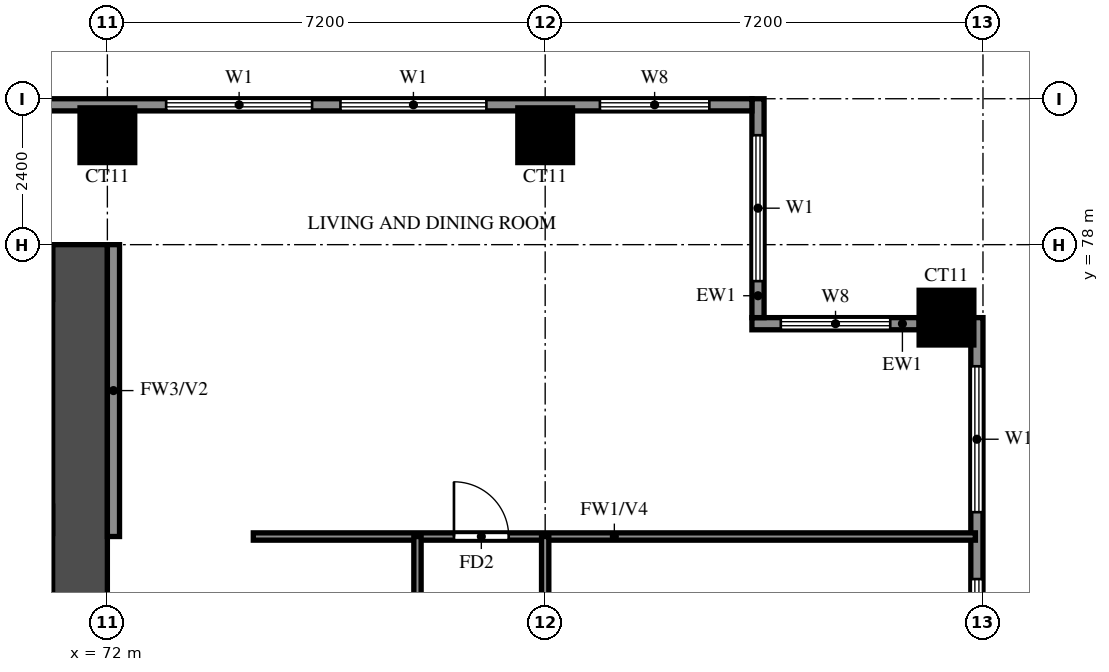
"""IFC4 building model, lengths in metres.
Left out: names, types, materials, properties, quantities, classifications, styles, units other than length and angle.
Written with IfcOpenShell. Run it as: python <this file> out.ifc"""

import sys

from ifc_helpers import new_model, si_unit, direction, frame, frame_2d, origin, origin_2d, place, context, subcontext, project, spatial, rectangle, extrude, source, transform, mapped, element, fill, save


model = new_model("IFC4")
c1 = context("Model", 3, precision=1e-05, world=origin(), true_north=direction((0.0, 1.0)))
c2 = subcontext(c1, "Body", "Model", "MODEL_VIEW")
j1 = project(units=[si_unit("LENGTHUNIT", "METRE"), si_unit("PLANEANGLEUNIT", "RADIAN")], contexts=[c1])
p1 = place(None, origin())
s1 = spatial("IfcSite", under=j1, at=p1, CompositionType="ELEMENT")
p2 = place(p1, origin())
s2 = spatial("IfcBuilding", under=s1, at=p2, CompositionType="ELEMENT")
p3 = place(p2, frame((0.0, 0.0, 100.5)))
s3 = spatial("IfcBuildingStorey", under=s2, at=p3, CompositionType="ELEMENT", Elevation=100.5)
m1 = source(origin(), c2, "Body", "SweptSolid", [
    extrude(rectangle(XDim=0.9, YDim=0.9, at=origin_2d()), origin(), (0.0, 0.0, 1.0), 3.18),
])
for number, where, z_axis, x_axis in (
    (1, (85.8, 76.8, 0.0), (0.0, 0.0, 1.0), (1.0, 0.0, 0.0)),
    (2, (72.0, 79.8, 0.0), (0.0, 0.0, 1.0), (1.0, 0.0, 0.0)),
    (3, (79.2, 79.8, 0.0), (0.0, 0.0, 1.0), (1.0, 0.0, 0.0)),
):
    element("IfcColumn", number, at=place(p3, frame(where, z_axis=z_axis, x_axis=x_axis)), inside=s3, PredefinedType="COLUMN", context=c2, shape_type="MappedRepresentation", body=[
        mapped(m1, transform((0.0, 0.0, 0.0))),
    ])
p4 = place(p3, frame((71.55, 66.0, 0.0), z_axis=(0.0, 0.0, 1.0), x_axis=(0.0, 1.0, 0.0)))
e4 = element("IfcWall", 4, at=p4, inside=s3, PredefinedType="SHEAR", context=c2, shape_type="SweptSolid", body=[
    extrude(rectangle(XDim=12.0, YDim=0.9, at=frame_2d((6.0, 0.0))), origin(), (0.0, 0.0, 1.0), 3.18),
])
p5 = place(p3, frame((29.7, 77.55, 0.0), z_axis=(0.0, 0.0, 1.0), x_axis=(1.0, 0.0, 0.0)))
e5 = element("IfcWall", 5, at=p5, inside=s3, PredefinedType="SHEAR", context=c2, shape_type="SweptSolid", body=[
    extrude(rectangle(XDim=41.4, YDim=0.9, at=frame_2d((20.7, 0.0))), origin(), (0.0, 0.0, 1.0), 3.18),
])
p6 = place(p3, frame((86.3, 48.2, 0.0), z_axis=(0.0, 0.0, 1.0), x_axis=(0.0, 1.0, 0.0)))
e6 = element("IfcWall", 6, at=p6, inside=s3, PredefinedType="SOLIDWALL", context=c2, shape_type="SweptSolid", body=[
    extrude(rectangle(XDim=28.6, YDim=0.2, at=frame_2d((14.3, 0.0))), origin(), (0.0, 0.0, 1.0), 3.18),
])
p7 = place(p6, frame((15.1, 0.0, 0.0)))
e7 = element("IfcOpeningElement", 7, at=p7, cuts=e6, PredefinedType="OPENING", context=c2, shape_type="SweptSolid", body=[
    extrude(rectangle(XDim=1.8, YDim=2.4, at=frame_2d((0.9, 1.2))), frame((0.0, 0.11, 0.0), z_axis=(0.0, -1.0, 0.0), x_axis=(1.0, 0.0, 0.0)), (0.0, 0.0, 1.0), 0.22),
])
p8 = place(p6, frame((0.6, 0.0, 0.6)))
e8 = element("IfcOpeningElement", 8, at=p8, cuts=e6, PredefinedType="OPENING", context=c2, shape_type="SweptSolid", body=[
    extrude(rectangle(XDim=2.4, YDim=2.4, at=frame_2d((1.2, 1.2))), frame((0.0, 0.11, 0.0), z_axis=(0.0, -1.0, 0.0), x_axis=(1.0, 0.0, 0.0)), (0.0, 0.0, 1.0), 0.22),
])
p9 = place(p6, frame((3.8, 0.0, 0.6)))
e9 = element("IfcOpeningElement", 9, at=p9, cuts=e6, PredefinedType="OPENING", context=c2, shape_type="SweptSolid", body=[
    extrude(rectangle(XDim=2.4, YDim=2.4, at=frame_2d((1.2, 1.2))), frame((0.0, 0.11, 0.0), z_axis=(0.0, -1.0, 0.0), x_axis=(1.0, 0.0, 0.0)), (0.0, 0.0, 1.0), 0.22),
])
p10 = place(p6, frame((7.8, 0.0, 0.6)))
e10 = element("IfcOpeningElement", 10, at=p10, cuts=e6, PredefinedType="OPENING", context=c2, shape_type="SweptSolid", body=[
    extrude(rectangle(XDim=2.4, YDim=2.4, at=frame_2d((1.2, 1.2))), frame((0.0, 0.11, 0.0), z_axis=(0.0, -1.0, 0.0), x_axis=(1.0, 0.0, 0.0)), (0.0, 0.0, 1.0), 0.22),
])
p11 = place(p6, frame((10.75, 0.0, 0.6)))
e11 = element("IfcOpeningElement", 11, at=p11, cuts=e6, PredefinedType="OPENING", context=c2, shape_type="SweptSolid", body=[
    extrude(rectangle(XDim=0.9, YDim=2.4, at=frame_2d((0.45, 1.2))), frame((0.0, 0.11, 0.0), z_axis=(0.0, -1.0, 0.0), x_axis=(1.0, 0.0, 0.0)), (0.0, 0.0, 1.0), 0.22),
])
p12 = place(p6, frame((12.5, 0.0, 0.6)))
e12 = element("IfcOpeningElement", 12, at=p12, cuts=e6, PredefinedType="OPENING", context=c2, shape_type="SweptSolid", body=[
    extrude(rectangle(XDim=1.2, YDim=2.4, at=frame_2d((0.6, 1.2))), frame((0.0, 0.11, 0.0), z_axis=(0.0, -1.0, 0.0), x_axis=(1.0, 0.0, 0.0)), (0.0, 0.0, 1.0), 0.22),
])
p13 = place(p6, frame((19.55, 0.0, 1.5)))
e13 = element("IfcOpeningElement", 13, at=p13, cuts=e6, PredefinedType="OPENING", context=c2, shape_type="SweptSolid", body=[
    extrude(rectangle(XDim=0.9, YDim=0.9, at=frame_2d((0.45, 0.45))), frame((0.0, 0.11, 0.0), z_axis=(0.0, -1.0, 0.0), x_axis=(1.0, 0.0, 0.0)), (0.0, 0.0, 1.0), 0.22),
])
p14 = place(p6, frame((22.5, 0.0, 0.6)))
e14 = element("IfcOpeningElement", 14, at=p14, cuts=e6, PredefinedType="OPENING", context=c2, shape_type="SweptSolid", body=[
    extrude(rectangle(XDim=1.8, YDim=2.4, at=frame_2d((0.9, 1.2))), frame((0.0, 0.11, 0.0), z_axis=(0.0, -1.0, 0.0), x_axis=(1.0, 0.0, 0.0)), (0.0, 0.0, 1.0), 0.22),
])
p15 = place(p6, frame((25.4, 0.0, 0.6)))
e15 = element("IfcOpeningElement", 15, at=p15, cuts=e6, PredefinedType="OPENING", context=c2, shape_type="SweptSolid", body=[
    extrude(rectangle(XDim=2.4, YDim=2.4, at=frame_2d((1.2, 1.2))), frame((0.0, 0.11, 0.0), z_axis=(0.0, -1.0, 0.0), x_axis=(1.0, 0.0, 0.0)), (0.0, 0.0, 1.0), 0.22),
])
p16 = place(p3, frame((85.35, 76.7, 0.0), z_axis=(0.0, 0.0, 1.0), x_axis=(-1.0, 0.0, 0.0)))
e16 = element("IfcWall", 16, at=p16, inside=s3, PredefinedType="SOLIDWALL", context=c2, shape_type="SweptSolid", body=[
    extrude(rectangle(XDim=2.75, YDim=0.2, at=frame_2d((1.375, 0.0))), origin(), (0.0, 0.0, 1.0), 3.18),
])
p17 = place(p16, frame((0.475, 0.0, 0.6)))
e17 = element("IfcOpeningElement", 17, at=p17, cuts=e16, PredefinedType="OPENING", context=c2, shape_type="SweptSolid", body=[
    extrude(rectangle(XDim=1.8, YDim=2.4, at=frame_2d((0.9, 1.2))), frame((0.0, 0.11, 0.0), z_axis=(0.0, -1.0, 0.0), x_axis=(1.0, 0.0, 0.0)), (0.0, 0.0, 1.0), 0.22),
])
p18 = place(p3, frame((82.7, 76.8, 0.0), z_axis=(0.0, 0.0, 1.0), x_axis=(0.0, 1.0, 0.0)))
e18 = element("IfcWall", 18, at=p18, inside=s3, PredefinedType="SOLIDWALL", context=c2, shape_type="SweptSolid", body=[
    extrude(rectangle(XDim=3.6, YDim=0.2, at=frame_2d((1.8, 0.0))), origin(), (0.0, 0.0, 1.0), 3.18),
])
p19 = place(p18, frame((0.6, 0.0, 0.6)))
e19 = element("IfcOpeningElement", 19, at=p19, cuts=e18, PredefinedType="OPENING", context=c2, shape_type="SweptSolid", body=[
    extrude(rectangle(XDim=2.4, YDim=2.4, at=frame_2d((1.2, 1.2))), frame((0.0, 0.11, 0.0), z_axis=(0.0, -1.0, 0.0), x_axis=(1.0, 0.0, 0.0)), (0.0, 0.0, 1.0), 0.22),
])
p20 = place(p3, frame((82.6, 80.3, 0.0), z_axis=(0.0, 0.0, 1.0), x_axis=(-1.0, 0.0, 0.0)))
e20 = element("IfcWall", 20, at=p20, inside=s3, PredefinedType="SOLIDWALL", context=c2, shape_type="SweptSolid", body=[
    extrude(rectangle(XDim=64.6, YDim=0.2, at=frame_2d((32.3, 0.0))), origin(), (0.0, 0.0, 1.0), 3.18),
])
p21 = place(p20, frame((58.3, 0.0, 0.0)))
e21 = element("IfcOpeningElement", 21, at=p21, cuts=e20, PredefinedType="OPENING", context=c2, shape_type="SweptSolid", body=[
    extrude(rectangle(XDim=1.8, YDim=2.4, at=frame_2d((0.9, 1.2))), frame((0.0, 0.11, 0.0), z_axis=(0.0, -1.0, 0.0), x_axis=(1.0, 0.0, 0.0)), (0.0, 0.0, 1.0), 0.22),
])
p22 = place(p20, frame((54.6, 0.0, 0.6)))
e22 = element("IfcOpeningElement", 22, at=p22, cuts=e20, PredefinedType="OPENING", context=c2, shape_type="SweptSolid", body=[
    extrude(rectangle(XDim=1.2, YDim=2.4, at=frame_2d((0.6, 1.2))), frame((0.0, 0.11, 0.0), z_axis=(0.0, -1.0, 0.0), x_axis=(1.0, 0.0, 0.0)), (0.0, 0.0, 1.0), 0.22),
])
p23 = place(p20, frame((56.95, 0.0, 0.6)))
e23 = element("IfcOpeningElement", 23, at=p23, cuts=e20, PredefinedType="OPENING", context=c2, shape_type="SweptSolid", body=[
    extrude(rectangle(XDim=0.9, YDim=2.4, at=frame_2d((0.45, 1.2))), frame((0.0, 0.11, 0.0), z_axis=(0.0, -1.0, 0.0), x_axis=(1.0, 0.0, 0.0)), (0.0, 0.0, 1.0), 0.22),
])
p24 = place(p20, frame((61.65, 0.0, 0.6)))
e24 = element("IfcOpeningElement", 24, at=p24, cuts=e20, PredefinedType="OPENING", context=c2, shape_type="SweptSolid", body=[
    extrude(rectangle(XDim=0.9, YDim=2.4, at=frame_2d((0.45, 1.2))), frame((0.0, 0.11, 0.0), z_axis=(0.0, -1.0, 0.0), x_axis=(1.0, 0.0, 0.0)), (0.0, 0.0, 1.0), 0.22),
])
p25 = place(p20, frame((0.7, 0.0, 0.6)))
e25 = element("IfcOpeningElement", 25, at=p25, cuts=e20, PredefinedType="OPENING", context=c2, shape_type="SweptSolid", body=[
    extrude(rectangle(XDim=1.8, YDim=2.4, at=frame_2d((0.9, 1.2))), frame((0.0, 0.11, 0.0), z_axis=(0.0, -1.0, 0.0), x_axis=(1.0, 0.0, 0.0)), (0.0, 0.0, 1.0), 0.22),
])
p26 = place(p20, frame((4.367, 0.0, 0.6)))
e26 = element("IfcOpeningElement", 26, at=p26, cuts=e20, PredefinedType="OPENING", context=c2, shape_type="SweptSolid", body=[
    extrude(rectangle(XDim=2.4, YDim=2.4, at=frame_2d((1.2, 1.2))), frame((0.0, 0.11, 0.0), z_axis=(0.0, -1.0, 0.0), x_axis=(1.0, 0.0, 0.0)), (0.0, 0.0, 1.0), 0.22),
])
p27 = place(p20, frame((7.233, 0.0, 0.6)))
e27 = element("IfcOpeningElement", 27, at=p27, cuts=e20, PredefinedType="OPENING", context=c2, shape_type="SweptSolid", body=[
    extrude(rectangle(XDim=2.4, YDim=2.4, at=frame_2d((1.2, 1.2))), frame((0.0, 0.11, 0.0), z_axis=(0.0, -1.0, 0.0), x_axis=(1.0, 0.0, 0.0)), (0.0, 0.0, 1.0), 0.22),
])
p28 = place(p3, frame((72.1, 73.2, 0.0), z_axis=(0.0, 0.0, 1.0), x_axis=(0.0, 1.0, 0.0)))
e28 = element("IfcWall", 28, at=p28, inside=s3, PredefinedType="SOLIDWALL", context=c2, shape_type="SweptSolid", body=[
    extrude(rectangle(XDim=4.8, YDim=0.2, at=frame_2d((2.4, 0.0))), origin(), (0.0, 0.0, 1.0), 3.18),
])
p29 = place(p3, frame((74.4, 73.2, 0.0), z_axis=(0.0, 0.0, 1.0), x_axis=(1.0, 0.0, 0.0)))
e29 = element("IfcWall", 29, at=p29, inside=s3, PredefinedType="PARTITIONING", context=c2, shape_type="SweptSolid", body=[
    extrude(rectangle(XDim=11.875, YDim=0.12, at=frame_2d((5.938, 0.0))), origin(), (0.0, 0.0, 1.0), 2.28),
])
p30 = place(p29, frame((3.3, 0.0, 0.0)))
e30 = element("IfcOpeningElement", 30, at=p30, cuts=e29, PredefinedType="OPENING", context=c2, shape_type="SweptSolid", body=[
    extrude(rectangle(XDim=0.9, YDim=2.1, at=frame_2d((0.45, 1.05))), frame((0.0, 0.07, 0.0), z_axis=(0.0, -1.0, 0.0), x_axis=(1.0, 0.0, 0.0)), (0.0, 0.0, 1.0), 0.14),
])
p31 = place(p3, frame((77.1, 64.8, 0.0), z_axis=(0.0, 0.0, 1.0), x_axis=(0.0, 1.0, 0.0)))
e31 = element("IfcWall", 31, at=p31, inside=s3, PredefinedType="PARTITIONING", context=c2, shape_type="SweptSolid", body=[
    extrude(rectangle(XDim=8.4, YDim=0.12, at=frame_2d((4.2, 0.0))), origin(), (0.0, 0.0, 1.0), 3.18),
])
p32 = place(p31, frame((1.875, 0.0, 0.0)))
e32 = element("IfcOpeningElement", 32, at=p32, cuts=e31, PredefinedType="OPENING", context=c2, shape_type="SweptSolid", body=[
    extrude(rectangle(XDim=0.9, YDim=2.1, at=frame_2d((0.45, 1.05))), frame((0.0, 0.07, 0.0), z_axis=(0.0, -1.0, 0.0), x_axis=(1.0, 0.0, 0.0)), (0.0, 0.0, 1.0), 0.14),
])
p33 = place(p31, frame((6.075, 0.0, 0.0)))
e33 = element("IfcOpeningElement", 33, at=p33, cuts=e31, PredefinedType="OPENING", context=c2, shape_type="SweptSolid", body=[
    extrude(rectangle(XDim=0.9, YDim=2.1, at=frame_2d((0.45, 1.05))), frame((0.0, 0.07, 0.0), z_axis=(0.0, -1.0, 0.0), x_axis=(1.0, 0.0, 0.0)), (0.0, 0.0, 1.0), 0.14),
])
p34 = place(p3, frame((79.2, 69.6, 0.0), z_axis=(0.0, 0.0, 1.0), x_axis=(0.0, 1.0, 0.0)))
e34 = element("IfcWall", 34, at=p34, inside=s3, PredefinedType="PARTITIONING", context=c2, shape_type="SweptSolid", body=[
    extrude(rectangle(XDim=3.6, YDim=0.12, at=frame_2d((1.8, 0.0))), origin(), (0.0, 0.0, 1.0), 3.18),
])
p35 = place(p34, frame((1.35, 0.0, 0.0)))
e35 = element("IfcOpeningElement", 35, at=p35, cuts=e34, PredefinedType="OPENING", context=c2, shape_type="SweptSolid", body=[
    extrude(rectangle(XDim=0.9, YDim=2.1, at=frame_2d((0.45, 1.05))), frame((0.0, 0.07, 0.0), z_axis=(0.0, -1.0, 0.0), x_axis=(1.0, 0.0, 0.0)), (0.0, 0.0, 1.0), 0.14),
])
p36 = place(p14, origin())
e36 = element("IfcWindow", 36, at=p36, inside=s3, PartitioningType="DOUBLE_PANEL_VERTICAL", PredefinedType="WINDOW", context=c2, shape_type="SweptSolid", body=[
    extrude(rectangle(XDim=1.8, YDim=2.4, at=frame_2d((0.9, 1.2))), frame((0.0, 0.03, 0.0), z_axis=(0.0, -1.0, 0.0), x_axis=(1.0, 0.0, 0.0)), (0.0, 0.0, 1.0), 0.06),
])
fill(e14, e36)
p37 = place(p15, origin())
e37 = element("IfcWindow", 37, at=p37, inside=s3, PartitioningType="DOUBLE_PANEL_VERTICAL", PredefinedType="WINDOW", context=c2, shape_type="SweptSolid", body=[
    extrude(rectangle(XDim=2.4, YDim=2.4, at=frame_2d((1.2, 1.2))), frame((0.0, 0.03, 0.0), z_axis=(0.0, -1.0, 0.0), x_axis=(1.0, 0.0, 0.0)), (0.0, 0.0, 1.0), 0.06),
])
fill(e15, e37)
p38 = place(p17, origin())
e38 = element("IfcWindow", 38, at=p38, inside=s3, PartitioningType="DOUBLE_PANEL_VERTICAL", PredefinedType="WINDOW", context=c2, shape_type="SweptSolid", body=[
    extrude(rectangle(XDim=1.8, YDim=2.4, at=frame_2d((0.9, 1.2))), frame((0.0, 0.03, 0.0), z_axis=(0.0, -1.0, 0.0), x_axis=(1.0, 0.0, 0.0)), (0.0, 0.0, 1.0), 0.06),
])
fill(e17, e38)
p39 = place(p19, origin())
e39 = element("IfcWindow", 39, at=p39, inside=s3, PartitioningType="DOUBLE_PANEL_VERTICAL", PredefinedType="WINDOW", context=c2, shape_type="SweptSolid", body=[
    extrude(rectangle(XDim=2.4, YDim=2.4, at=frame_2d((1.2, 1.2))), frame((0.0, 0.03, 0.0), z_axis=(0.0, -1.0, 0.0), x_axis=(1.0, 0.0, 0.0)), (0.0, 0.0, 1.0), 0.06),
])
fill(e19, e39)
p40 = place(p25, origin())
e40 = element("IfcWindow", 40, at=p40, inside=s3, PartitioningType="DOUBLE_PANEL_VERTICAL", PredefinedType="WINDOW", context=c2, shape_type="SweptSolid", body=[
    extrude(rectangle(XDim=1.8, YDim=2.4, at=frame_2d((0.9, 1.2))), frame((0.0, 0.03, 0.0), z_axis=(0.0, -1.0, 0.0), x_axis=(1.0, 0.0, 0.0)), (0.0, 0.0, 1.0), 0.06),
])
fill(e25, e40)
p41 = place(p26, origin())
e41 = element("IfcWindow", 41, at=p41, inside=s3, PartitioningType="DOUBLE_PANEL_VERTICAL", PredefinedType="WINDOW", context=c2, shape_type="SweptSolid", body=[
    extrude(rectangle(XDim=2.4, YDim=2.4, at=frame_2d((1.2, 1.2))), frame((0.0, 0.03, 0.0), z_axis=(0.0, -1.0, 0.0), x_axis=(1.0, 0.0, 0.0)), (0.0, 0.0, 1.0), 0.06),
])
fill(e26, e41)
p42 = place(p27, origin())
e42 = element("IfcWindow", 42, at=p42, inside=s3, PartitioningType="DOUBLE_PANEL_VERTICAL", PredefinedType="WINDOW", context=c2, shape_type="SweptSolid", body=[
    extrude(rectangle(XDim=2.4, YDim=2.4, at=frame_2d((1.2, 1.2))), frame((0.0, 0.03, 0.0), z_axis=(0.0, -1.0, 0.0), x_axis=(1.0, 0.0, 0.0)), (0.0, 0.0, 1.0), 0.06),
])
fill(e27, e42)
p43 = place(p30, origin())
e43 = element("IfcDoor", 43, at=p43, inside=s3, OperationType="SINGLE_SWING_LEFT", PredefinedType="DOOR", context=c2, shape_type="SweptSolid", body=[
    extrude(rectangle(XDim=0.9, YDim=2.1, at=frame_2d((0.45, 1.05))), frame((0.0, 0.025, 0.0), z_axis=(0.0, -1.0, 0.0), x_axis=(1.0, 0.0, 0.0)), (0.0, 0.0, 1.0), 0.05),
])
fill(e30, e43)
save(model, sys.argv[1])
